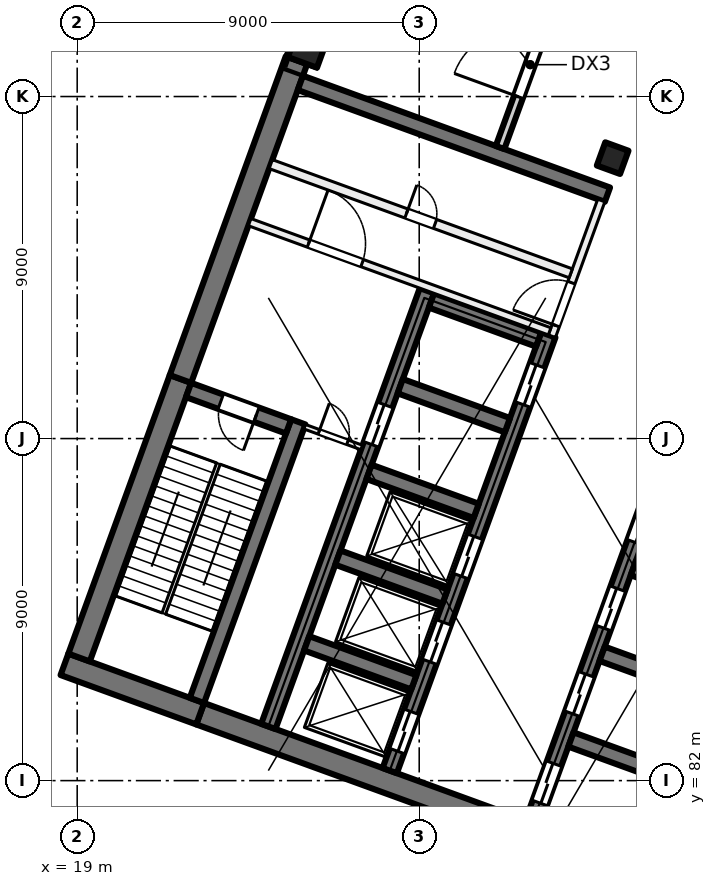
"""IFC4 building model, lengths in metres.
Left out: names, types, materials, properties, quantities, classifications, styles, units other than length and angle.
Written with IfcOpenShell. Run it as: python <this file> out.ifc"""

import sys

from ifc_helpers import new_model, si_unit, direction, frame, frame_2d, origin, origin_2d, place, context, subcontext, project, spatial, rectangle, extrude, element, fill, save


model = new_model("IFC4")
c1 = context("Model", 3, precision=1e-05, world=origin(), true_north=direction((0.0, 1.0)))
c2 = subcontext(c1, "Body", "Model", "MODEL_VIEW")
j1 = project(units=[si_unit("LENGTHUNIT", "METRE"), si_unit("PLANEANGLEUNIT", "RADIAN")], contexts=[c1])
p1 = place(None, origin())
s1 = spatial("IfcSite", under=j1, at=p1, CompositionType="ELEMENT")
p2 = place(p1, origin())
s2 = spatial("IfcBuilding", under=s1, at=p2, CompositionType="ELEMENT")
p3 = place(p2, frame((0.0, 0.0, 129.0)))
s3 = spatial("IfcBuildingStorey", under=s2, at=p3, CompositionType="ELEMENT", Elevation=129.0)
p4 = place(p3, frame((33.091, 98.379, 0.0), z_axis=(0.0, 0.0, 1.0), x_axis=(-0.342020143326, -0.939692620786, 0.0)))
e1 = element("IfcColumn", 1, at=p4, inside=s3, PredefinedType="COLUMN", context=c2, shape_type="SweptSolid", body=[
    extrude(rectangle(XDim=0.65, YDim=0.65, at=origin_2d()), origin(), (0.0, 0.0, 1.0), 5.5),
])
p5 = place(p3, frame((25.056, 101.303, 0.0), z_axis=(0.0, 0.0, 1.0), x_axis=(-0.342020143326, -0.939692620786, 0.0)))
e2 = element("IfcColumn", 2, at=p5, inside=s3, PredefinedType="COLUMN", context=c2, shape_type="SweptSolid", body=[
    extrude(rectangle(XDim=0.85, YDim=0.85, at=origin_2d()), origin(), (0.0, 0.0, 1.0), 5.5),
])
p6 = place(p3, frame((35.767, 78.835, 0.0), z_axis=(0.0, 0.0, 1.0), x_axis=(-0.939692894512, 0.342019391267, 0.0)))
e3 = element("IfcWall", 3, at=p6, inside=s3, PredefinedType="SHEAR", context=c2, shape_type="SweptSolid", body=[
    extrude(rectangle(XDim=14.4, YDim=0.6, at=frame_2d((7.2, 0.0))), origin(), (0.0, 0.0, 1.0), 5.5),
])
p7 = place(p3, frame((22.236, 83.76, 0.0), z_axis=(0.0, 0.0, 1.0), x_axis=(-0.939680822529, 0.342052557032, 0.0)))
e4 = element("IfcWall", 4, at=p7, inside=s3, PredefinedType="SHEAR", context=c2, shape_type="SweptSolid", body=[
    extrude(rectangle(XDim=3.8, YDim=0.6, at=frame_2d((1.9, 0.0))), origin(), (0.0, 0.0, 1.0), 5.5),
])
p8 = place(p3, frame((19.05, 85.239, 0.0), z_axis=(0.0, 0.0, 1.0), x_axis=(0.342016982193, 0.939693771338, 0.0)))
e5 = element("IfcWall", 5, at=p8, inside=s3, PredefinedType="SHEAR", context=c2, shape_type="SweptSolid", body=[
    extrude(rectangle(XDim=7.8, YDim=0.6, at=frame_2d((3.9, 0.0))), origin(), (0.0, 0.0, 1.0), 5.5),
])
p9 = place(p3, frame((21.717, 92.568, 0.0), z_axis=(0.0, 0.0, 1.0), x_axis=(0.342017595281, 0.939693548195, 0.0)))
e6 = element("IfcWall", 6, at=p9, inside=s3, PredefinedType="SHEAR", context=c2, shape_type="SweptSolid", body=[
    extrude(rectangle(XDim=8.925, YDim=0.6, at=frame_2d((4.462, 0.0))), origin(), (0.0, 0.0, 1.0), 5.5),
])
p10 = place(p3, frame((22.15, 84.11, 0.0), z_axis=(0.0, 0.0, 1.0), x_axis=(0.342016982193, 0.939693771338, 0.0)))
e7 = element("IfcWall", 7, at=p10, inside=s3, PredefinedType="SHEAR", context=c2, shape_type="SweptSolid", body=[
    extrude(rectangle(XDim=7.8, YDim=0.4, at=frame_2d((3.9, 0.0))), origin(), (0.0, 0.0, 1.0), 5.5),
])
p11 = place(p3, frame((24.562, 91.32, 0.0), z_axis=(0.0, 0.0, 1.0), x_axis=(-0.939717030584, 0.341953070509, 0.0)))
e8 = element("IfcWall", 8, at=p11, inside=s3, PredefinedType="SHEAR", context=c2, shape_type="SweptSolid", body=[
    extrude(rectangle(XDim=2.8, YDim=0.4, at=frame_2d((1.4, 0.0))), origin(), (0.0, 0.0, 1.0), 5.5),
])
p12 = place(p11, frame((0.9, 0.0, 0.0)))
e9 = element("IfcOpeningElement", 9, at=p12, cuts=e8, PredefinedType="OPENING", context=c2, shape_type="SweptSolid", body=[
    extrude(rectangle(XDim=1.0, YDim=2.1, at=frame_2d((0.5, 1.05))), frame((0.0, 0.21, 0.0), z_axis=(0.0, -1.0, 0.0), x_axis=(1.0, 0.0, 0.0)), (0.0, 0.0, 1.0), 0.42),
])
p13 = place(p3, frame((30.984, 80.895, 0.0), z_axis=(0.0, 0.0, 1.0), x_axis=(0.342021021735, 0.939692301071, 0.0)))
e10 = element("IfcWall", 10, at=p13, inside=s3, PredefinedType="SHEAR", context=c2, shape_type="SweptSolid", body=[
    extrude(rectangle(XDim=12.2, YDim=0.4, at=frame_2d((6.1, 0.0))), origin(), (0.0, 0.0, 1.0), 5.5),
])
p14 = place(p13, frame((0.55, 0.0, 0.0)))
e11 = element("IfcOpeningElement", 11, at=p14, cuts=e10, PredefinedType="OPENING", context=c2, shape_type="SweptSolid", body=[
    extrude(rectangle(XDim=1.1, YDim=2.1, at=frame_2d((0.55, 1.05))), frame((0.0, 0.21, 0.0), z_axis=(0.0, -1.0, 0.0), x_axis=(1.0, 0.0, 0.0)), (0.0, 0.0, 1.0), 0.42),
])
p15 = place(p13, frame((3.05, 0.0, 0.0)))
e12 = element("IfcOpeningElement", 12, at=p15, cuts=e10, PredefinedType="OPENING", context=c2, shape_type="SweptSolid", body=[
    extrude(rectangle(XDim=1.1, YDim=2.1, at=frame_2d((0.55, 1.05))), frame((0.0, 0.21, 0.0), z_axis=(0.0, -1.0, 0.0), x_axis=(1.0, 0.0, 0.0)), (0.0, 0.0, 1.0), 0.42),
])
p16 = place(p13, frame((5.45, 0.0, 0.0)))
e13 = element("IfcOpeningElement", 13, at=p16, cuts=e10, PredefinedType="OPENING", context=c2, shape_type="SweptSolid", body=[
    extrude(rectangle(XDim=1.1, YDim=2.1, at=frame_2d((0.55, 1.05))), frame((0.0, 0.21, 0.0), z_axis=(0.0, -1.0, 0.0), x_axis=(1.0, 0.0, 0.0)), (0.0, 0.0, 1.0), 0.42),
])
p17 = place(p13, frame((7.85, 0.0, 0.0)))
e14 = element("IfcOpeningElement", 14, at=p17, cuts=e10, PredefinedType="OPENING", context=c2, shape_type="SweptSolid", body=[
    extrude(rectangle(XDim=1.1, YDim=2.1, at=frame_2d((0.55, 1.05))), frame((0.0, 0.21, 0.0), z_axis=(0.0, -1.0, 0.0), x_axis=(1.0, 0.0, 0.0)), (0.0, 0.0, 1.0), 0.42),
])
p18 = place(p13, frame((10.25, 0.0, 0.0)))
e15 = element("IfcOpeningElement", 15, at=p18, cuts=e10, PredefinedType="OPENING", context=c2, shape_type="SweptSolid", body=[
    extrude(rectangle(XDim=1.1, YDim=2.1, at=frame_2d((0.55, 1.05))), frame((0.0, 0.21, 0.0), z_axis=(0.0, -1.0, 0.0), x_axis=(1.0, 0.0, 0.0)), (0.0, 0.0, 1.0), 0.42),
])
for number, where, z_axis, x_axis in (
    (16, (34.812, 82.056, 0.0), (0.0, 0.0, 1.0), (-0.94, 0.342, 0.0)),
    (17, (35.632, 84.311, 0.0), (0.0, 0.0, 1.0), (-0.94, 0.342, 0.0)),
    (18, (36.453, 86.566, 0.0), (0.0, 0.0, 1.0), (-0.94, 0.342, 0.0)),
):
    element("IfcWall", number, at=place(p3, frame(where, z_axis=z_axis, x_axis=x_axis)), inside=s3, PredefinedType="SHEAR", context=c2, shape_type="SweptSolid", body=[
        extrude(rectangle(XDim=3.0, YDim=0.4, at=frame_2d((1.5, 0.0))), origin(), (0.0, 0.0, 1.0), 5.5),
    ])
p19 = place(p3, frame((27.225, 82.263, 0.0), z_axis=(0.0, 0.0, 1.0), x_axis=(0.342014590177, 0.939694641948, 0.0)))
e19 = element("IfcWall", 19, at=p19, inside=s3, PredefinedType="SHEAR", context=c2, shape_type="SweptSolid", body=[
    extrude(rectangle(XDim=12.2, YDim=0.4, at=frame_2d((6.1, 0.0))), origin(), (0.0, 0.0, 1.0), 5.5),
])
p20 = place(p19, frame((0.55, 0.0, 0.0)))
e20 = element("IfcOpeningElement", 20, at=p20, cuts=e19, PredefinedType="OPENING", context=c2, shape_type="SweptSolid", body=[
    extrude(rectangle(XDim=1.1, YDim=2.1, at=frame_2d((0.55, 1.05))), frame((0.0, 0.21, 0.0), z_axis=(0.0, -1.0, 0.0), x_axis=(1.0, 0.0, 0.0)), (0.0, 0.0, 1.0), 0.42),
])
p21 = place(p19, frame((3.05, 0.0, 0.0)))
e21 = element("IfcOpeningElement", 21, at=p21, cuts=e19, PredefinedType="OPENING", context=c2, shape_type="SweptSolid", body=[
    extrude(rectangle(XDim=1.1, YDim=2.1, at=frame_2d((0.55, 1.05))), frame((0.0, 0.21, 0.0), z_axis=(0.0, -1.0, 0.0), x_axis=(1.0, 0.0, 0.0)), (0.0, 0.0, 1.0), 0.42),
])
p22 = place(p19, frame((5.45, 0.0, 0.0)))
e22 = element("IfcOpeningElement", 22, at=p22, cuts=e19, PredefinedType="OPENING", context=c2, shape_type="SweptSolid", body=[
    extrude(rectangle(XDim=1.1, YDim=2.1, at=frame_2d((0.55, 1.05))), frame((0.0, 0.21, 0.0), z_axis=(0.0, -1.0, 0.0), x_axis=(1.0, 0.0, 0.0)), (0.0, 0.0, 1.0), 0.42),
])
p23 = place(p19, frame((10.25, 0.0, 0.0)))
e23 = element("IfcOpeningElement", 23, at=p23, cuts=e19, PredefinedType="OPENING", context=c2, shape_type="SweptSolid", body=[
    extrude(rectangle(XDim=1.1, YDim=2.1, at=frame_2d((0.55, 1.05))), frame((0.0, 0.21, 0.0), z_axis=(0.0, -1.0, 0.0), x_axis=(1.0, 0.0, 0.0)), (0.0, 0.0, 1.0), 0.42),
])
p24 = place(p3, frame((24.03, 83.426, 0.0), z_axis=(0.0, 0.0, 1.0), x_axis=(0.342014590177, 0.939694641948, 0.0)))
e24 = element("IfcWall", 24, at=p24, inside=s3, PredefinedType="SHEAR", context=c2, shape_type="SweptSolid", body=[
    extrude(rectangle(XDim=12.2, YDim=0.4, at=frame_2d((6.1, 0.0))), origin(), (0.0, 0.0, 1.0), 5.5),
])
p25 = place(p24, frame((7.9, 0.0, 0.0)))
e25 = element("IfcOpeningElement", 25, at=p25, cuts=e24, PredefinedType="OPENING", context=c2, shape_type="SweptSolid", body=[
    extrude(rectangle(XDim=1.1, YDim=2.1, at=frame_2d((0.55, 1.05))), frame((0.0, 0.21, 0.0), z_axis=(0.0, -1.0, 0.0), x_axis=(1.0, 0.0, 0.0)), (0.0, 0.0, 1.0), 0.42),
])
p26 = place(p3, frame((27.858, 84.587, 0.0), z_axis=(0.0, 0.0, 1.0), x_axis=(-0.939686455819, 0.342037080957, 0.0)))
e26 = element("IfcWall", 26, at=p26, inside=s3, PredefinedType="SHEAR", context=c2, shape_type="SweptSolid", body=[
    extrude(rectangle(XDim=3.0, YDim=0.4, at=frame_2d((1.5, 0.0))), origin(), (0.0, 0.0, 1.0), 5.5),
])
p27 = place(p3, frame((28.678, 86.842, 0.0), z_axis=(0.0, 0.0, 1.0), x_axis=(-0.939676934218, 0.342063238742, 0.0)))
e27 = element("IfcWall", 27, at=p27, inside=s3, PredefinedType="SHEAR", context=c2, shape_type="SweptSolid", body=[
    extrude(rectangle(XDim=3.0, YDim=0.4, at=frame_2d((1.5, 0.0))), origin(), (0.0, 0.0, 1.0), 5.5),
])
for number, where, z_axis, x_axis in (
    (28, (29.5, 89.097, 0.0), (0.0, 0.0, 1.0), (-0.94, 0.342, 0.0)),
    (29, (30.32, 91.353, 0.0), (0.0, 0.0, 1.0), (-0.94, 0.342, 0.0)),
    (30, (31.141, 93.608, 0.0), (0.0, 0.0, 1.0), (-0.94, 0.342, 0.0)),
):
    element("IfcWall", number, at=place(p3, frame(where, z_axis=z_axis, x_axis=x_axis)), inside=s3, PredefinedType="SHEAR", context=c2, shape_type="SweptSolid", body=[
        extrude(rectangle(XDim=3.0, YDim=0.4, at=frame_2d((1.5, 0.0))), origin(), (0.0, 0.0, 1.0), 5.5),
    ])
p28 = place(p3, frame((32.953, 97.418, 0.0), z_axis=(0.0, 0.0, 1.0), x_axis=(-0.93969060187, 0.342025690201, 0.0)))
e31 = element("IfcWall", 31, at=p28, inside=s3, PredefinedType="SHEAR", context=c2, shape_type="SweptSolid", body=[
    extrude(rectangle(XDim=8.6, YDim=0.4, at=frame_2d((4.3, 0.0))), origin(), (0.0, 0.0, 1.0), 5.5),
])
p29 = place(p3, frame((30.128, 98.659, 0.0), z_axis=(0.0, 0.0, 1.0), x_axis=(0.341996679836, 0.939701160466, 0.0)))
e32 = element("IfcWall", 32, at=p29, inside=s3, PredefinedType="SOLIDWALL", context=c2, shape_type="SweptSolid", body=[
    extrude(rectangle(XDim=4.637, YDim=0.24, at=frame_2d((2.319, 0.0))), origin(), (0.0, 0.0, 1.0), 5.125),
])
p30 = place(p29, frame((1.419, 0.0, 0.0)))
e33 = element("IfcOpeningElement", 33, at=p30, cuts=e32, PredefinedType="OPENING", context=c2, shape_type="SweptSolid", body=[
    extrude(rectangle(XDim=1.8, YDim=2.4, at=frame_2d((0.9, 1.2))), frame((0.0, 0.13, 0.0), z_axis=(0.0, -1.0, 0.0), x_axis=(1.0, 0.0, 0.0)), (0.0, 0.0, 1.0), 0.26),
])
p31 = place(p3, frame((31.491, 93.693, 0.0), z_axis=(0.0, 0.0, 1.0), x_axis=(0.341995824804, 0.939701471648, 0.0)))
e34 = element("IfcWall", 34, at=p31, inside=s3, PredefinedType="PARTITIONING", context=c2, shape_type="SweptSolid", body=[
    extrude(rectangle(XDim=3.8, YDim=0.2, at=frame_2d((1.9, 0.0))), origin(), (0.0, 0.0, 1.0), 5.125),
])
p32 = place(p31, frame((0.3, 0.0, 0.0)))
e35 = element("IfcOpeningElement", 35, at=p32, cuts=e34, PredefinedType="OPENING", context=c2, shape_type="SweptSolid", body=[
    extrude(rectangle(XDim=1.2, YDim=2.1, at=frame_2d((0.6, 1.05))), frame((0.0, 0.11, 0.0), z_axis=(0.0, -1.0, 0.0), x_axis=(1.0, 0.0, 0.0)), (0.0, 0.0, 1.0), 0.22),
])
p33 = place(p3, frame((23.538, 96.694, 0.0), z_axis=(0.0, 0.0, 1.0), x_axis=(0.939691552312, -0.342023078919, 0.0)))
e36 = element("IfcWall", 36, at=p33, inside=s3, PredefinedType="PARTITIONING", context=c2, shape_type="SweptSolid", body=[
    extrude(rectangle(XDim=8.4, YDim=0.2, at=frame_2d((4.2, 0.0))), origin(), (0.0, 0.0, 1.0), 5.125),
])
p34 = place(p33, frame((1.65, 0.0, 0.0)))
e37 = element("IfcOpeningElement", 37, at=p34, cuts=e36, PredefinedType="OPENING", context=c2, shape_type="SweptSolid", body=[
    extrude(rectangle(XDim=1.5, YDim=2.1, at=frame_2d((0.75, 1.05))), frame((0.0, 0.11, 0.0), z_axis=(0.0, -1.0, 0.0), x_axis=(1.0, 0.0, 0.0)), (0.0, 0.0, 1.0), 0.22),
])
p35 = place(p3, frame((24.094, 98.221, 0.0), z_axis=(0.0, 0.0, 1.0), x_axis=(0.939691552312, -0.342023078919, 0.0)))
e38 = element("IfcWall", 38, at=p35, inside=s3, PredefinedType="PARTITIONING", context=c2, shape_type="SweptSolid", body=[
    extrude(rectangle(XDim=8.4, YDim=0.25, at=frame_2d((4.2, 0.0))), origin(), (0.0, 0.0, 1.0), 5.125),
])
p36 = place(p35, frame((3.8, 0.0, 0.0)))
e39 = element("IfcOpeningElement", 39, at=p36, cuts=e38, PredefinedType="OPENING", context=c2, shape_type="SweptSolid", body=[
    extrude(rectangle(XDim=0.8, YDim=2.1, at=frame_2d((0.4, 1.05))), frame((0.0, 0.135, 0.0), z_axis=(0.0, -1.0, 0.0), x_axis=(1.0, 0.0, 0.0)), (0.0, 0.0, 1.0), 0.27),
])
p37 = place(p3, frame((24.985, 91.312, 0.0), z_axis=(0.0, 0.0, 1.0), x_axis=(0.939708740826, -0.341975850632, 0.0)))
e40 = element("IfcWall", 40, at=p37, inside=s3, PredefinedType="PARTITIONING", context=c2, shape_type="SweptSolid", body=[
    extrude(rectangle(XDim=1.6, YDim=0.125, at=frame_2d((0.8, 0.0))), origin(), (0.0, 0.0, 1.0), 5.125),
])
p38 = place(p37, frame((0.4, 0.0, 0.0)))
e41 = element("IfcOpeningElement", 41, at=p38, cuts=e40, PredefinedType="OPENING", context=c2, shape_type="SweptSolid", body=[
    extrude(rectangle(XDim=0.8, YDim=2.1, at=frame_2d((0.4, 1.05))), frame((0.0, 0.073, 0.0), z_axis=(0.0, -1.0, 0.0), x_axis=(1.0, 0.0, 0.0)), (0.0, 0.0, 1.0), 0.145),
])
p39 = place(p30, origin())
e42 = element("IfcDoor", 42, at=p39, inside=s3, OperationType="DOUBLE_DOOR_SINGLE_SWING", PredefinedType="DOOR", context=c2, shape_type="SweptSolid", body=[
    extrude(rectangle(XDim=1.8, YDim=2.4, at=frame_2d((0.9, 1.2))), frame((0.0, 0.025, 0.0), z_axis=(0.0, -1.0, 0.0), x_axis=(1.0, 0.0, 0.0)), (0.0, 0.0, 1.0), 0.05),
])
fill(e33, e42)
p40 = place(p20, origin())
e43 = element("IfcDoor", 43, at=p40, inside=s3, OperationType="DOUBLE_DOOR_SLIDING", PredefinedType="DOOR", context=c2, shape_type="SweptSolid", body=[
    extrude(rectangle(XDim=1.1, YDim=2.1, at=frame_2d((0.55, 1.05))), frame((0.0, 0.025, 0.0), z_axis=(0.0, -1.0, 0.0), x_axis=(1.0, 0.0, 0.0)), (0.0, 0.0, 1.0), 0.05),
])
fill(e20, e43)
p41 = place(p21, origin())
e44 = element("IfcDoor", 44, at=p41, inside=s3, OperationType="DOUBLE_DOOR_SLIDING", PredefinedType="DOOR", context=c2, shape_type="SweptSolid", body=[
    extrude(rectangle(XDim=1.1, YDim=2.1, at=frame_2d((0.55, 1.05))), frame((0.0, 0.025, 0.0), z_axis=(0.0, -1.0, 0.0), x_axis=(1.0, 0.0, 0.0)), (0.0, 0.0, 1.0), 0.05),
])
fill(e21, e44)
p42 = place(p22, origin())
e45 = element("IfcDoor", 45, at=p42, inside=s3, OperationType="DOUBLE_DOOR_SLIDING", PredefinedType="DOOR", context=c2, shape_type="SweptSolid", body=[
    extrude(rectangle(XDim=1.1, YDim=2.1, at=frame_2d((0.55, 1.05))), frame((0.0, 0.025, 0.0), z_axis=(0.0, -1.0, 0.0), x_axis=(1.0, 0.0, 0.0)), (0.0, 0.0, 1.0), 0.05),
])
fill(e22, e45)
p43 = place(p23, origin())
e46 = element("IfcDoor", 46, at=p43, inside=s3, OperationType="DOUBLE_DOOR_SLIDING", PredefinedType="DOOR", context=c2, shape_type="SweptSolid", body=[
    extrude(rectangle(XDim=1.1, YDim=2.1, at=frame_2d((0.55, 1.05))), frame((0.0, 0.025, 0.0), z_axis=(0.0, -1.0, 0.0), x_axis=(1.0, 0.0, 0.0)), (0.0, 0.0, 1.0), 0.05),
])
fill(e23, e46)
p44 = place(p14, origin())
e47 = element("IfcDoor", 47, at=p44, inside=s3, OperationType="DOUBLE_DOOR_SLIDING", PredefinedType="DOOR", context=c2, shape_type="SweptSolid", body=[
    extrude(rectangle(XDim=1.1, YDim=2.1, at=frame_2d((0.55, 1.05))), frame((0.0, 0.025, 0.0), z_axis=(0.0, -1.0, 0.0), x_axis=(1.0, 0.0, 0.0)), (0.0, 0.0, 1.0), 0.05),
])
fill(e11, e47)
p45 = place(p15, origin())
e48 = element("IfcDoor", 48, at=p45, inside=s3, OperationType="DOUBLE_DOOR_SLIDING", PredefinedType="DOOR", context=c2, shape_type="SweptSolid", body=[
    extrude(rectangle(XDim=1.1, YDim=2.1, at=frame_2d((0.55, 1.05))), frame((0.0, 0.025, 0.0), z_axis=(0.0, -1.0, 0.0), x_axis=(1.0, 0.0, 0.0)), (0.0, 0.0, 1.0), 0.05),
])
fill(e12, e48)
p46 = place(p16, origin())
e49 = element("IfcDoor", 49, at=p46, inside=s3, OperationType="DOUBLE_DOOR_SLIDING", PredefinedType="DOOR", context=c2, shape_type="SweptSolid", body=[
    extrude(rectangle(XDim=1.1, YDim=2.1, at=frame_2d((0.55, 1.05))), frame((0.0, 0.025, 0.0), z_axis=(0.0, -1.0, 0.0), x_axis=(1.0, 0.0, 0.0)), (0.0, 0.0, 1.0), 0.05),
])
fill(e13, e49)
p47 = place(p17, origin())
e50 = element("IfcDoor", 50, at=p47, inside=s3, OperationType="DOUBLE_DOOR_SLIDING", PredefinedType="DOOR", context=c2, shape_type="SweptSolid", body=[
    extrude(rectangle(XDim=1.1, YDim=2.1, at=frame_2d((0.55, 1.05))), frame((0.0, 0.025, 0.0), z_axis=(0.0, -1.0, 0.0), x_axis=(1.0, 0.0, 0.0)), (0.0, 0.0, 1.0), 0.05),
])
fill(e14, e50)
p48 = place(p32, origin())
e51 = element("IfcDoor", 51, at=p48, inside=s3, OperationType="DOUBLE_DOOR_SINGLE_SWING", PredefinedType="DOOR", context=c2, shape_type="SweptSolid", body=[
    extrude(rectangle(XDim=1.2, YDim=2.1, at=frame_2d((0.6, 1.05))), frame((0.0, 0.025, 0.0), z_axis=(0.0, -1.0, 0.0), x_axis=(1.0, 0.0, 0.0)), (0.0, 0.0, 1.0), 0.05),
])
fill(e35, e51)
p49 = place(p34, origin())
e52 = element("IfcDoor", 52, at=p49, inside=s3, OperationType="DOUBLE_DOOR_SINGLE_SWING", PredefinedType="DOOR", context=c2, shape_type="SweptSolid", body=[
    extrude(rectangle(XDim=1.5, YDim=2.1, at=frame_2d((0.75, 1.05))), frame((0.0, 0.025, 0.0), z_axis=(0.0, -1.0, 0.0), x_axis=(1.0, 0.0, 0.0)), (0.0, 0.0, 1.0), 0.05),
])
fill(e37, e52)
p50 = place(p12, origin())
e53 = element("IfcDoor", 53, at=p50, inside=s3, OperationType="SINGLE_SWING_LEFT", PredefinedType="DOOR", context=c2, shape_type="SweptSolid", body=[
    extrude(rectangle(XDim=1.0, YDim=2.1, at=frame_2d((0.5, 1.05))), frame((0.0, 0.025, 0.0), z_axis=(0.0, -1.0, 0.0), x_axis=(1.0, 0.0, 0.0)), (0.0, 0.0, 1.0), 0.05),
])
fill(e9, e53)
p51 = place(p38, origin())
e54 = element("IfcDoor", 54, at=p51, inside=s3, OperationType="SINGLE_SWING_RIGHT", PredefinedType="DOOR", context=c2, shape_type="SweptSolid", body=[
    extrude(rectangle(XDim=0.8, YDim=2.1, at=frame_2d((0.4, 1.05))), frame((0.0, 0.025, 0.0), z_axis=(0.0, -1.0, 0.0), x_axis=(1.0, 0.0, 0.0)), (0.0, 0.0, 1.0), 0.05),
])
fill(e41, e54)
p52 = place(p36, origin())
e55 = element("IfcDoor", 55, at=p52, inside=s3, OperationType="SINGLE_SWING_LEFT", PredefinedType="DOOR", context=c2, shape_type="SweptSolid", body=[
    extrude(rectangle(XDim=0.8, YDim=2.1, at=frame_2d((0.4, 1.05))), frame((0.0, 0.025, 0.0), z_axis=(0.0, -1.0, 0.0), x_axis=(1.0, 0.0, 0.0)), (0.0, 0.0, 1.0), 0.05),
])
fill(e39, e55)
p53 = place(p25, origin())
e56 = element("IfcDoor", 56, at=p53, inside=s3, OperationType="DOUBLE_DOOR_SLIDING", PredefinedType="DOOR", context=c2, shape_type="SweptSolid", body=[
    extrude(rectangle(XDim=1.1, YDim=2.1, at=frame_2d((0.55, 1.05))), frame((0.0, 0.025, 0.0), z_axis=(0.0, -1.0, 0.0), x_axis=(1.0, 0.0, 0.0)), (0.0, 0.0, 1.0), 0.05),
])
fill(e25, e56)
save(model, sys.argv[1])
